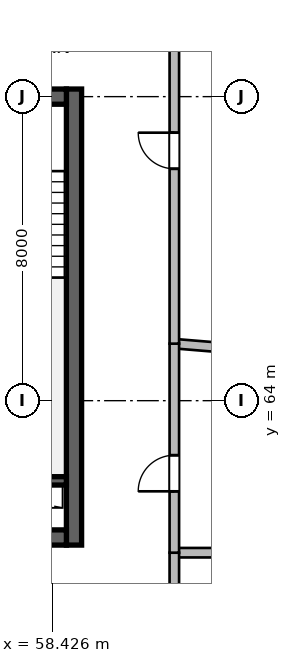
"""IFC4 building model, lengths in metres.
Left out: names, types, materials, properties, quantities, classifications, styles, units other than length and angle.
Written with IfcOpenShell. Run it as: python <this file> out.ifc"""

import sys

from ifc_helpers import new_model, si_unit, direction, frame, frame_2d, origin, place, context, subcontext, project, spatial, rectangle, extrude, source, transform, mapped, element, fill, save


model = new_model("IFC4")
c1 = context("Model", 3, precision=1e-05, world=origin(), true_north=direction((0.0, 1.0)))
c2 = subcontext(c1, "Body", "Model", "MODEL_VIEW")
j1 = project(units=[si_unit("LENGTHUNIT", "METRE"), si_unit("PLANEANGLEUNIT", "RADIAN")], contexts=[c1])
p1 = place(None, origin())
s1 = spatial("IfcSite", under=j1, at=p1, CompositionType="ELEMENT")
p2 = place(p1, origin())
s2 = spatial("IfcBuilding", under=s1, at=p2, CompositionType="ELEMENT")
p3 = place(p2, frame((0.0, 0.0, 299.1)))
s3 = spatial("IfcBuildingStorey", under=s2, at=p3, CompositionType="ELEMENT", Elevation=299.1)
m1 = source(origin(), c2, "Body", "SweptSolid", [
    extrude(rectangle(XDim=12.0, YDim=0.4, at=frame_2d((6.0, 0.0))), origin(), (0.0, 0.0, 1.0), 3.9),
])
p4 = place(p3, frame((59.0, 60.2, 0.0), z_axis=(0.0, 0.0, 1.0), x_axis=(0.0, 1.0, 0.0)))
e1 = element("IfcWall", 1, at=p4, inside=s3, PredefinedType="SHEAR", context=c2, shape_type="MappedRepresentation", body=[
    mapped(m1, transform((0.0, 0.0, 0.0), scale=1.0)),
])
m2 = source(origin(), c2, "Body", "SweptSolid", [
    extrude(rectangle(XDim=21.6, YDim=0.4, at=frame_2d((10.8, 0.0))), origin(), (0.0, 0.0, 1.0), 3.9),
])
p5 = place(p3, frame((37.2, 60.4, 0.0), z_axis=(0.0, 0.0, 1.0), x_axis=(1.0, 0.0, 0.0)))
e2 = element("IfcWall", 2, at=p5, inside=s3, PredefinedType="SHEAR", context=c2, shape_type="MappedRepresentation", body=[
    mapped(m2, transform((0.0, 0.0, 0.0), scale=1.0)),
])
p6 = place(p5, frame((1.1, 0.0, 0.0)))
e3 = element("IfcOpeningElement", 3, at=p6, cuts=e2, PredefinedType="OPENING", context=c2, shape_type="SweptSolid", body=[
    extrude(rectangle(XDim=1.15, YDim=2.15, at=frame_2d((0.575, 1.075))), frame((0.0, 0.21, 0.0), z_axis=(0.0, -1.0, 0.0), x_axis=(1.0, 0.0, 0.0)), (0.0, 0.0, 1.0), 0.42),
])
p7 = place(p5, frame((19.5, 0.0, 0.0)))
e4 = element("IfcOpeningElement", 4, at=p7, cuts=e2, PredefinedType="OPENING", context=c2, shape_type="SweptSolid", body=[
    extrude(rectangle(XDim=0.9, YDim=2.1, at=frame_2d((0.45, 1.05))), frame((0.0, 0.21, 0.0), z_axis=(0.0, -1.0, 0.0), x_axis=(1.0, 0.0, 0.0)), (0.0, 0.0, 1.0), 0.42),
])
p8 = place(p5, frame((12.02, 0.0, 0.0)))
e5 = element("IfcOpeningElement", 5, at=p8, cuts=e2, PredefinedType="OPENING", context=c2, shape_type="SweptSolid", body=[
    extrude(rectangle(XDim=1.6, YDim=2.15, at=frame_2d((0.8, 1.075))), frame((0.0, 0.21, 0.0), z_axis=(0.0, -1.0, 0.0), x_axis=(1.0, 0.0, 0.0)), (0.0, 0.0, 1.0), 0.42),
])
p9 = place(p3, frame((37.2, 72.0, 0.0), z_axis=(0.0, 0.0, 1.0), x_axis=(1.0, 0.0, 0.0)))
e6 = element("IfcWall", 6, at=p9, inside=s3, PredefinedType="SHEAR", context=c2, shape_type="MappedRepresentation", body=[
    mapped(m2, transform((0.0, 0.0, 0.0), scale=1.0)),
])
p10 = place(p9, frame((1.2, 0.0, 0.0)))
e7 = element("IfcOpeningElement", 7, at=p10, cuts=e6, PredefinedType="OPENING", context=c2, shape_type="SweptSolid", body=[
    extrude(rectangle(XDim=0.9, YDim=2.1, at=frame_2d((0.45, 1.05))), frame((0.0, 0.21, 0.0), z_axis=(0.0, -1.0, 0.0), x_axis=(1.0, 0.0, 0.0)), (0.0, 0.0, 1.0), 0.42),
])
p11 = place(p9, frame((14.7, 0.0, 0.0)))
e8 = element("IfcOpeningElement", 8, at=p11, cuts=e6, PredefinedType="OPENING", context=c2, shape_type="SweptSolid", body=[
    extrude(rectangle(XDim=1.2, YDim=2.15, at=frame_2d((0.6, 1.075))), frame((0.0, 0.21, 0.0), z_axis=(0.0, -1.0, 0.0), x_axis=(1.0, 0.0, 0.0)), (0.0, 0.0, 1.0), 0.42),
])
p12 = place(p9, frame((4.15, 0.0, 0.0)))
e9 = element("IfcOpeningElement", 9, at=p12, cuts=e6, PredefinedType="OPENING", context=c2, shape_type="SweptSolid", body=[
    extrude(rectangle(XDim=1.3, YDim=2.15, at=frame_2d((0.65, 1.075))), frame((0.0, 0.21, 0.0), z_axis=(0.0, -1.0, 0.0), x_axis=(1.0, 0.0, 0.0)), (0.0, 0.0, 1.0), 0.42),
])
p13 = place(p9, frame((7.25, 0.0, 0.0)))
e10 = element("IfcOpeningElement", 10, at=p13, cuts=e6, PredefinedType="OPENING", context=c2, shape_type="SweptSolid", body=[
    extrude(rectangle(XDim=0.9, YDim=2.1, at=frame_2d((0.45, 1.05))), frame((0.0, 0.21, 0.0), z_axis=(0.0, -1.0, 0.0), x_axis=(1.0, 0.0, 0.0)), (0.0, 0.0, 1.0), 0.42),
])
p14 = place(p9, frame((10.95, 0.0, 0.0)))
e11 = element("IfcOpeningElement", 11, at=p14, cuts=e6, PredefinedType="OPENING", context=c2, shape_type="SweptSolid", body=[
    extrude(rectangle(XDim=0.9, YDim=2.1, at=frame_2d((0.45, 1.05))), frame((0.0, 0.21, 0.0), z_axis=(0.0, -1.0, 0.0), x_axis=(1.0, 0.0, 0.0)), (0.0, 0.0, 1.0), 0.42),
])
m3 = source(origin(), c2, "Body", "SweptSolid", [
    extrude(rectangle(XDim=3.27, YDim=0.22, at=frame_2d((1.635, 0.0))), origin(), (0.0, 0.0, 1.0), 3.9),
])
p15 = place(p3, frame((55.53, 61.89, 0.0), z_axis=(0.0, 0.0, 1.0), x_axis=(1.0, 0.0, 0.0)))
e12 = element("IfcWall", 12, at=p15, inside=s3, PredefinedType="SHEAR", context=c2, shape_type="MappedRepresentation", body=[
    mapped(m3, transform((0.0, 0.0, 0.0), scale=1.0)),
])
m4 = source(origin(), c2, "Body", "SweptSolid", [
    extrude(rectangle(XDim=11.633, YDim=0.25, at=frame_2d((5.816, 0.0))), origin(), (0.0, 0.0, 1.0), 3.64),
])
p16 = place(p3, frame((61.64, 60.0, 0.0), z_axis=(0.0, 0.0, 1.0), x_axis=(1.0, 0.0, 0.0)))
e13 = element("IfcWall", 13, at=p16, inside=s3, PredefinedType="PARTITIONING", context=c2, shape_type="MappedRepresentation", body=[
    mapped(m4, transform((0.0, 0.0, 0.0), scale=1.0)),
])
m5 = source(origin(), c2, "Body", "SweptSolid", [
    extrude(rectangle(XDim=2.04, YDim=0.25, at=frame_2d((1.02, 0.0))), origin(), (0.0, 0.0, 1.0), 3.64),
])
p17 = place(p3, frame((61.64, 57.96, 0.0), z_axis=(0.0, 0.0, 1.0), x_axis=(0.0, 1.0, 0.0)))
e14 = element("IfcWall", 14, at=p17, inside=s3, PredefinedType="PARTITIONING", context=c2, shape_type="MappedRepresentation", body=[
    mapped(m5, transform((0.0, 0.0, 0.0), scale=1.0)),
])
m6 = source(origin(), c2, "Body", "SweptSolid", [
    extrude(rectangle(XDim=11.787, YDim=0.25, at=frame_2d((5.893, 0.0))), origin(), (0.0, 0.0, 1.0), 3.64),
])
p18 = place(p3, frame((61.64, 65.5, 0.0), z_axis=(0.0, 0.0, 1.0), x_axis=(0.996614976318, -0.082210637868, 0.0)))
e15 = element("IfcWall", 15, at=p18, inside=s3, PredefinedType="PARTITIONING", context=c2, shape_type="MappedRepresentation", body=[
    mapped(m6, transform((0.0, 0.0, 0.0), scale=1.0)),
])
m7 = source(origin(), c2, "Body", "SweptSolid", [
    extrude(rectangle(XDim=5.5, YDim=0.25, at=frame_2d((2.75, 0.0))), origin(), (0.0, 0.0, 1.0), 3.64),
])
p19 = place(p3, frame((61.64, 60.0, 0.0), z_axis=(0.0, 0.0, 1.0), x_axis=(0.0, 1.0, 0.0)))
e16 = element("IfcWall", 16, at=p19, inside=s3, PredefinedType="PARTITIONING", context=c2, shape_type="MappedRepresentation", body=[
    mapped(m7, transform((0.0, 0.0, 0.0), scale=1.0)),
])
p20 = place(p19, frame((1.615, 0.0, 0.0)))
e17 = element("IfcOpeningElement", 17, at=p20, cuts=e16, PredefinedType="OPENING", context=c2, shape_type="SweptSolid", body=[
    extrude(rectangle(XDim=0.95, YDim=2.1, at=frame_2d((0.475, 1.05))), frame((0.0, 0.135, 0.0), z_axis=(0.0, -1.0, 0.0), x_axis=(1.0, 0.0, 0.0)), (0.0, 0.0, 1.0), 0.27),
])
m8 = source(origin(), c2, "Body", "SweptSolid", [
    extrude(rectangle(XDim=10.153, YDim=0.25, at=frame_2d((5.077, 0.0))), origin(), (0.0, 0.0, 1.0), 3.64),
])
p21 = place(p3, frame((61.64, 65.5, 0.0), z_axis=(0.0, 0.0, 1.0), x_axis=(0.0, 1.0, 0.0)))
e18 = element("IfcWall", 18, at=p21, inside=s3, PredefinedType="PARTITIONING", context=c2, shape_type="MappedRepresentation", body=[
    mapped(m8, transform((0.0, 0.0, 0.0), scale=1.0)),
])
p22 = place(p21, frame((4.602, 0.0, 0.0)))
e19 = element("IfcOpeningElement", 19, at=p22, cuts=e18, PredefinedType="OPENING", context=c2, shape_type="SweptSolid", body=[
    extrude(rectangle(XDim=0.95, YDim=2.1, at=frame_2d((0.475, 1.05))), frame((0.0, 0.135, 0.0), z_axis=(0.0, -1.0, 0.0), x_axis=(1.0, 0.0, 0.0)), (0.0, 0.0, 1.0), 0.27),
])
m9 = source(origin(), c2, "Body", "SweptSolid", [
    extrude(rectangle(XDim=0.95, YDim=2.1, at=frame_2d((0.475, 1.05))), frame((0.0, 0.025, 0.0), z_axis=(0.0, -1.0, 0.0), x_axis=(1.0, 0.0, 0.0)), (0.0, 0.0, 1.0), 0.05),
])
p23 = place(p20, origin())
e20 = element("IfcDoor", 20, at=p23, inside=s3, OperationType="SINGLE_SWING_LEFT", PredefinedType="DOOR", context=c2, shape_type="MappedRepresentation", body=[
    mapped(m9, transform((0.0, 0.0, 0.0), scale=1.0)),
])
fill(e17, e20)
p24 = place(p22, origin())
e21 = element("IfcDoor", 21, at=p24, inside=s3, OperationType="SINGLE_SWING_RIGHT", PredefinedType="DOOR", context=c2, shape_type="MappedRepresentation", body=[
    mapped(m9, transform((0.0, 0.0, 0.0), scale=1.0)),
])
fill(e19, e21)
save(model, sys.argv[1])
